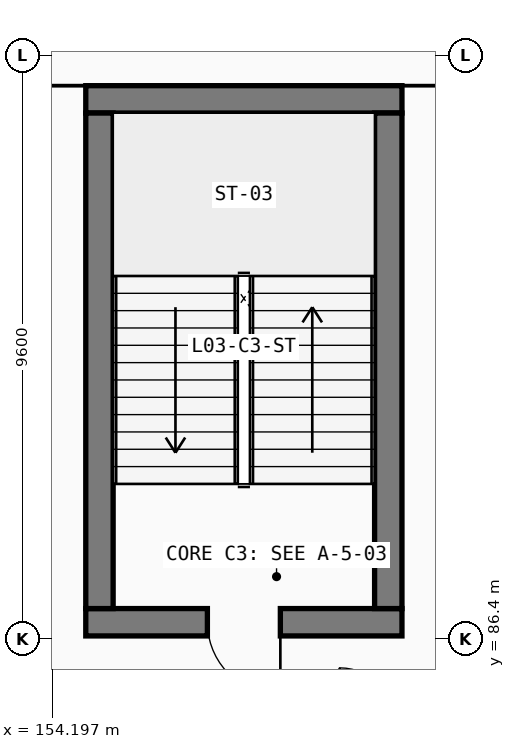
"""IFC4 building model, lengths in metres.
Left out: names, types, materials, properties, quantities, classifications, styles, units other than length and angle.
Written with IfcOpenShell. Run it as: python <this file> out.ifc"""

import sys

from ifc_helpers import new_model, si_unit, direction, frame, frame_2d, origin, place, context, subcontext, project, spatial, rectangle, extrude, element, fill, save


model = new_model("IFC4")
c1 = context("Model", 3, precision=1e-05, world=origin(), true_north=direction((0.0, 1.0)))
c2 = subcontext(c1, "Body", "Model", "MODEL_VIEW")
j1 = project(units=[si_unit("LENGTHUNIT", "METRE"), si_unit("PLANEANGLEUNIT", "RADIAN")], contexts=[c1])
p1 = place(None, origin())
s1 = spatial("IfcSite", under=j1, at=p1, CompositionType="ELEMENT")
p2 = place(p1, origin())
s2 = spatial("IfcBuilding", under=s1, at=p2, CompositionType="ELEMENT")
p3 = place(p2, frame((0.0, 0.0, 14.1)))
s3 = spatial("IfcBuildingStorey", under=s2, at=p3, CompositionType="ELEMENT", Elevation=14.1)
p4 = place(p3, frame((154.75, 86.675, 0.0), z_axis=(0.0, 0.0, 1.0), x_axis=(1.0, 0.0, 0.0)))
e1 = element("IfcWall", 1, at=p4, inside=s3, PredefinedType="SHEAR", context=c2, shape_type="SweptSolid", body=[
    extrude(rectangle(XDim=5.2, YDim=0.45, at=frame_2d((2.6, 0.0))), origin(), (0.0, 0.0, 1.0), 4.24),
])
p5 = place(p4, frame((3.2, 0.0, 0.0), z_axis=(0.0, 0.0, 1.0), x_axis=(-1.0, 0.0, 0.0)))
e2 = element("IfcOpeningElement", 2, at=p5, cuts=e1, PredefinedType="OPENING", context=c2, shape_type="SweptSolid", body=[
    extrude(rectangle(XDim=1.2, YDim=2.2, at=frame_2d((0.6, 1.1))), frame((0.0, 0.235, 0.0), z_axis=(0.0, -1.0, 0.0), x_axis=(1.0, 0.0, 0.0)), (0.0, 0.0, 1.0), 0.47),
])
p6 = place(p3, frame((159.95, 95.275, 0.0), z_axis=(0.0, 0.0, 1.0), x_axis=(-1.0, 0.0, 0.0)))
e3 = element("IfcWall", 3, at=p6, inside=s3, PredefinedType="SHEAR", context=c2, shape_type="SweptSolid", body=[
    extrude(rectangle(XDim=5.2, YDim=0.45, at=frame_2d((2.6, 0.0))), origin(), (0.0, 0.0, 1.0), 4.24),
])
for number, where, z_axis, x_axis in (
    (4, (154.975, 95.05, 0.0), (0.0, 0.0, 1.0), (0.0, -1.0, 0.0)),
    (5, (159.725, 86.9, 0.0), (0.0, 0.0, 1.0), (0.0, 1.0, 0.0)),
):
    element("IfcWall", number, at=place(p3, frame(where, z_axis=z_axis, x_axis=x_axis)), inside=s3, PredefinedType="SHEAR", context=c2, shape_type="SweptSolid", body=[
        extrude(rectangle(XDim=8.15, YDim=0.45, at=frame_2d((4.075, 0.0))), origin(), (0.0, 0.0, 1.0), 4.24),
    ])
p7 = place(p5, origin())
e6 = element("IfcDoor", 6, at=p7, inside=s3, OperationType="SINGLE_SWING_LEFT", PredefinedType="DOOR", context=c2, shape_type="SweptSolid", body=[
    extrude(rectangle(XDim=1.2, YDim=2.2, at=frame_2d((0.6, 1.1))), frame((0.0, 0.025, 0.0), z_axis=(0.0, -1.0, 0.0), x_axis=(1.0, 0.0, 0.0)), (0.0, 0.0, 1.0), 0.05),
])
fill(e2, e6)
save(model, sys.argv[1])
